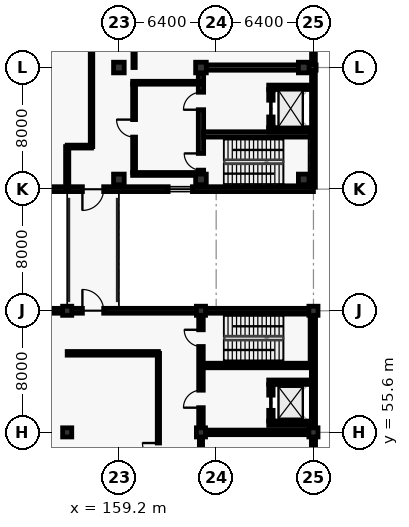
"""IFC4 building model, lengths in metres.
Left out: names, types, materials, properties, quantities, classifications, styles, units other than length and angle.
Written with IfcOpenShell. Run it as: python <this file> out.ifc"""

import sys

from ifc_helpers import new_model, si_unit, direction, frame, frame_2d, origin, origin_2d, place, context, subcontext, project, spatial, rectangle, extrude, element, fill, save


model = new_model("IFC4")
c1 = context("Model", 3, precision=1e-05, world=origin(), true_north=direction((0.0, 1.0)))
c2 = subcontext(c1, "Body", "Model", "MODEL_VIEW")
j1 = project(units=[si_unit("LENGTHUNIT", "METRE"), si_unit("PLANEANGLEUNIT", "RADIAN")], contexts=[c1])
p1 = place(None, origin())
s1 = spatial("IfcSite", under=j1, at=p1, CompositionType="ELEMENT")
p2 = place(p1, origin())
s2 = spatial("IfcBuilding", under=s1, at=p2, CompositionType="ELEMENT")
p3 = place(p2, frame((0.0, 0.0, 5.4)))
s3 = spatial("IfcBuildingStorey", under=s2, at=p3, CompositionType="ELEMENT", Elevation=5.4)
for number, where, z_axis, x_axis in (
    (1, (155.8, 55.6, 0.0), (0.0, 0.0, 1.0), (1.0, 0.0, 0.0)),
    (2, (155.8, 63.6, 0.0), (0.0, 0.0, 1.0), (1.0, 0.0, 0.0)),
    (3, (164.6, 55.6, 0.0), (0.0, 0.0, 1.0), (1.0, 0.0, 0.0)),
    (4, (164.6, 63.6, 0.0), (0.0, 0.0, 1.0), (1.0, 0.0, 0.0)),
    (5, (172.0, 55.6, 0.0), (0.0, 0.0, 1.0), (1.0, 0.0, 0.0)),
    (6, (172.0, 63.6, 0.0), (0.0, 0.0, 1.0), (1.0, 0.0, 0.0)),
):
    element("IfcColumn", number, at=place(p3, frame(where, z_axis=z_axis, x_axis=x_axis)), inside=s3, PredefinedType="COLUMN", context=c2, shape_type="SweptSolid", body=[
        extrude(rectangle(XDim=0.6, YDim=0.6, at=origin_2d()), origin(), (0.0, 0.0, 1.0), 4.8),
    ])
for number, where, z_axis, x_axis in (
    (7, (159.2, 72.24, 0.0), (0.0, 0.0, 1.0), (1.0, 0.0, 0.0)),
    (8, (159.2, 79.6, 0.0), (0.0, 0.0, 1.0), (1.0, 0.0, 0.0)),
    (9, (164.6, 72.24, 0.0), (0.0, 0.0, 1.0), (1.0, 0.0, 0.0)),
    (10, (164.6, 79.6, 0.0), (0.0, 0.0, 1.0), (1.0, 0.0, 0.0)),
    (11, (171.36, 72.24, 0.0), (0.0, 0.0, 1.0), (1.0, 0.0, 0.0)),
    (12, (171.36, 79.6, 0.0), (0.0, 0.0, 1.0), (1.0, 0.0, 0.0)),
):
    element("IfcColumn", number, at=place(p3, frame(where, z_axis=z_axis, x_axis=x_axis)), inside=s3, PredefinedType="COLUMN", context=c2, shape_type="SweptSolid", body=[
        extrude(rectangle(XDim=0.7, YDim=0.7, at=origin_2d()), origin(), (0.0, 0.0, 1.0), 4.8),
    ])
p4 = place(p3, frame((149.2, 63.6, 0.0), z_axis=(0.0, 0.0, 1.0), x_axis=(1.0, 0.0, 0.0)))
e13 = element("IfcWall", 13, at=p4, inside=s3, PredefinedType="SOLIDWALL", context=c2, shape_type="SweptSolid", body=[
    extrude(rectangle(XDim=22.8, YDim=0.32, at=frame_2d((11.4, 0.0))), origin(), (0.0, 0.0, 1.0), 3.67),
])
p5 = place(p4, frame((2.2, 0.0, 0.9)))
e14 = element("IfcOpeningElement", 14, at=p5, cuts=e13, PredefinedType="OPENING", context=c2, shape_type="SweptSolid", body=[
    extrude(rectangle(XDim=2.2, YDim=1.7, at=frame_2d((1.1, 0.85))), frame((0.0, 0.17, 0.0), z_axis=(0.0, -1.0, 0.0), x_axis=(1.0, 0.0, 0.0)), (0.0, 0.0, 1.0), 0.34),
])
p6 = place(p4, frame((7.6, 0.0, 0.0)))
e15 = element("IfcOpeningElement", 15, at=p6, cuts=e13, PredefinedType="OPENING", context=c2, shape_type="SweptSolid", body=[
    extrude(rectangle(XDim=1.4, YDim=2.25, at=frame_2d((0.7, 1.125))), frame((0.0, 0.17, 0.0), z_axis=(0.0, -1.0, 0.0), x_axis=(1.0, 0.0, 0.0)), (0.0, 0.0, 1.0), 0.34),
])
p7 = place(p3, frame((172.0, 63.6, 0.0), z_axis=(0.0, 0.0, 1.0), x_axis=(0.0, -1.0, 0.0)))
e16 = element("IfcWall", 16, at=p7, inside=s3, PredefinedType="SOLIDWALL", context=c2, shape_type="SweptSolid", body=[
    extrude(rectangle(XDim=56.0, YDim=0.275, at=frame_2d((28.0, 0.0))), origin(), (0.0, 0.0, 1.0), 3.67),
])
p8 = place(p7, frame((10.933, 0.0, 0.8)))
e17 = element("IfcOpeningElement", 17, at=p8, cuts=e16, PredefinedType="OPENING", context=c2, shape_type="SweptSolid", body=[
    extrude(rectangle(XDim=1.8, YDim=2.15, at=frame_2d((0.9, 1.075))), frame((0.0, 0.147, 0.0), z_axis=(0.0, -1.0, 0.0), x_axis=(1.0, 0.0, 0.0)), (0.0, 0.0, 1.0), 0.295),
])
p9 = place(p7, frame((19.667, 0.0, 0.8)))
e18 = element("IfcOpeningElement", 18, at=p9, cuts=e16, PredefinedType="OPENING", context=c2, shape_type="SweptSolid", body=[
    extrude(rectangle(XDim=1.9, YDim=2.2, at=frame_2d((0.95, 1.1))), frame((0.0, 0.147, 0.0), z_axis=(0.0, -1.0, 0.0), x_axis=(1.0, 0.0, 0.0)), (0.0, 0.0, 1.0), 0.295),
])
p10 = place(p7, frame((28.4, 0.0, 0.8)))
e19 = element("IfcOpeningElement", 19, at=p10, cuts=e16, PredefinedType="OPENING", context=c2, shape_type="SweptSolid", body=[
    extrude(rectangle(XDim=2.0, YDim=2.2, at=frame_2d((1.0, 1.1))), frame((0.0, 0.147, 0.0), z_axis=(0.0, -1.0, 0.0), x_axis=(1.0, 0.0, 0.0)), (0.0, 0.0, 1.0), 0.295),
])
p11 = place(p7, frame((37.133, 0.0, 0.8)))
e20 = element("IfcOpeningElement", 20, at=p11, cuts=e16, PredefinedType="OPENING", context=c2, shape_type="SweptSolid", body=[
    extrude(rectangle(XDim=2.1, YDim=2.2, at=frame_2d((1.05, 1.1))), frame((0.0, 0.147, 0.0), z_axis=(0.0, -1.0, 0.0), x_axis=(1.0, 0.0, 0.0)), (0.0, 0.0, 1.0), 0.295),
])
p12 = place(p7, frame((45.117, 0.0, 0.8)))
e21 = element("IfcOpeningElement", 21, at=p12, cuts=e16, PredefinedType="OPENING", context=c2, shape_type="SweptSolid", body=[
    extrude(rectangle(XDim=2.2, YDim=2.25, at=frame_2d((1.1, 1.125))), frame((0.0, 0.147, 0.0), z_axis=(0.0, -1.0, 0.0), x_axis=(1.0, 0.0, 0.0)), (0.0, 0.0, 1.0), 0.295),
])
p13 = place(p3, frame((172.0, 117.86, 0.0), z_axis=(0.0, 0.0, 1.0), x_axis=(0.0, -1.0, 0.0)))
e22 = element("IfcWall", 22, at=p13, inside=s3, PredefinedType="SOLIDWALL", context=c2, shape_type="SweptSolid", body=[
    extrude(rectangle(XDim=46.12, YDim=0.25, at=frame_2d((23.06, 0.0))), origin(), (0.0, 0.0, 1.0), 4.55),
])
p14 = place(p3, frame((172.0, 71.6, 0.0), z_axis=(0.0, 0.0, 1.0), x_axis=(-1.0, 0.0, 0.0)))
e23 = element("IfcWall", 23, at=p14, inside=s3, PredefinedType="SOLIDWALL", context=c2, shape_type="SweptSolid", body=[
    extrude(rectangle(XDim=32.4, YDim=0.32, at=frame_2d((16.2, 0.0))), origin(), (0.0, 0.0, 1.0), 3.85),
])
p15 = place(p14, frame((7.96, 0.0, 0.8)))
e24 = element("IfcOpeningElement", 24, at=p15, cuts=e23, PredefinedType="OPENING", context=c2, shape_type="SweptSolid", body=[
    extrude(rectangle(XDim=1.6, YDim=1.65, at=frame_2d((0.8, 0.825))), frame((0.0, 0.17, 0.0), z_axis=(0.0, -1.0, 0.0), x_axis=(1.0, 0.0, 0.0)), (0.0, 0.0, 1.0), 0.34),
])
p16 = place(p14, frame((19.48, 0.0, 0.8)))
e25 = element("IfcOpeningElement", 25, at=p16, cuts=e23, PredefinedType="OPENING", context=c2, shape_type="SweptSolid", body=[
    extrude(rectangle(XDim=1.6, YDim=1.65, at=frame_2d((0.8, 0.825))), frame((0.0, 0.17, 0.0), z_axis=(0.0, -1.0, 0.0), x_axis=(1.0, 0.0, 0.0)), (0.0, 0.0, 1.0), 0.34),
])
p17 = place(p14, frame((25.24, 0.0, 0.8)))
e26 = element("IfcOpeningElement", 26, at=p17, cuts=e23, PredefinedType="OPENING", context=c2, shape_type="SweptSolid", body=[
    extrude(rectangle(XDim=1.6, YDim=1.65, at=frame_2d((0.8, 0.825))), frame((0.0, 0.17, 0.0), z_axis=(0.0, -1.0, 0.0), x_axis=(1.0, 0.0, 0.0)), (0.0, 0.0, 1.0), 0.34),
])
p18 = place(p14, frame((13.8, 0.0, 0.0)))
e27 = element("IfcOpeningElement", 27, at=p18, cuts=e23, PredefinedType="OPENING", context=c2, shape_type="SweptSolid", body=[
    extrude(rectangle(XDim=1.4, YDim=2.25, at=frame_2d((0.7, 1.125))), frame((0.0, 0.17, 0.0), z_axis=(0.0, -1.0, 0.0), x_axis=(1.0, 0.0, 0.0)), (0.0, 0.0, 1.0), 0.34),
])
p19 = place(p3, frame((164.952, 79.6, 0.0), z_axis=(0.0, 0.0, 1.0), x_axis=(1.0, 0.0, 0.0)))
e28 = element("IfcWall", 28, at=p19, inside=s3, PredefinedType="SHEAR", context=c2, shape_type="SweptSolid", body=[
    extrude(rectangle(XDim=7.223, YDim=0.35, at=frame_2d((3.612, 0.0))), origin(), (0.0, 0.0, 1.0), 4.55),
])
p20 = place(p3, frame((164.6, 71.775, 0.0), z_axis=(0.0, 0.0, 1.0), x_axis=(0.0, 1.0, 0.0)))
e29 = element("IfcWall", 29, at=p20, inside=s3, PredefinedType="SHEAR", context=c2, shape_type="SweptSolid", body=[
    extrude(rectangle(XDim=7.473, YDim=0.35, at=frame_2d((3.737, 0.0))), origin(), (0.0, 0.0, 1.0), 4.55),
])
p21 = place(p20, frame((1.075, 0.0, 0.0)))
e30 = element("IfcOpeningElement", 30, at=p21, cuts=e29, PredefinedType="OPENING", context=c2, shape_type="SweptSolid", body=[
    extrude(rectangle(XDim=1.1, YDim=2.15, at=frame_2d((0.55, 1.075))), frame((0.0, 0.185, 0.0), z_axis=(0.0, -1.0, 0.0), x_axis=(1.0, 0.0, 0.0)), (0.0, 0.0, 1.0), 0.37),
])
p22 = place(p20, frame((5.05, 0.0, 0.0)))
e31 = element("IfcOpeningElement", 31, at=p22, cuts=e29, PredefinedType="OPENING", context=c2, shape_type="SweptSolid", body=[
    extrude(rectangle(XDim=1.15, YDim=2.2, at=frame_2d((0.575, 1.1))), frame((0.0, 0.185, 0.0), z_axis=(0.0, -1.0, 0.0), x_axis=(1.0, 0.0, 0.0)), (0.0, 0.0, 1.0), 0.37),
])
p23 = place(p3, frame((164.775, 75.2, 0.0), z_axis=(0.0, 0.0, 1.0), x_axis=(1.0, 0.0, 0.0)))
e32 = element("IfcWall", 32, at=p23, inside=s3, PredefinedType="SHEAR", context=c2, shape_type="SweptSolid", body=[
    extrude(rectangle(XDim=7.05, YDim=0.35, at=frame_2d((3.525, 0.0))), origin(), (0.0, 0.0, 1.0), 4.55),
])
for number, where, z_axis, x_axis in (
    (33, (169.055, 75.5, 0.0), (0.0, 0.0, 1.0), (1.0, 0.0, 0.0)),
    (34, (169.055, 78.3, 0.0), (0.0, 0.0, 1.0), (1.0, 0.0, 0.0)),
):
    element("IfcWall", number, at=place(p3, frame(where, z_axis=z_axis, x_axis=x_axis)), inside=s3, PredefinedType="SHEAR", context=c2, shape_type="SweptSolid", body=[
        extrude(rectangle(XDim=2.89, YDim=0.29, at=frame_2d((1.445, 0.0))), origin(), (0.0, 0.0, 1.0), 4.55),
    ])
p24 = place(p3, frame((169.2, 75.645, 0.0), z_axis=(0.0, 0.0, 1.0), x_axis=(0.0, 1.0, 0.0)))
e35 = element("IfcWall", 35, at=p24, inside=s3, PredefinedType="SHEAR", context=c2, shape_type="SweptSolid", body=[
    extrude(rectangle(XDim=2.51, YDim=0.29, at=frame_2d((1.255, 0.0))), origin(), (0.0, 0.0, 1.0), 4.55),
])
p25 = place(p24, frame((0.705, 0.0, 0.0)))
e36 = element("IfcOpeningElement", 36, at=p25, cuts=e35, PredefinedType="OPENING", context=c2, shape_type="SweptSolid", body=[
    extrude(rectangle(XDim=1.1, YDim=2.15, at=frame_2d((0.55, 1.075))), frame((0.0, 0.155, 0.0), z_axis=(0.0, -1.0, 0.0), x_axis=(1.0, 0.0, 0.0)), (0.0, 0.0, 1.0), 0.31),
])
p26 = place(p3, frame((160.105, 72.6, 0.0), z_axis=(0.0, 0.0, 1.0), x_axis=(1.0, 0.0, 0.0)))
e37 = element("IfcWall", 37, at=p26, inside=s3, PredefinedType="PARTITIONING", context=c2, shape_type="SweptSolid", body=[
    extrude(rectangle(XDim=4.143, YDim=0.19, at=frame_2d((2.072, 0.0))), origin(), (0.0, 0.0, 1.0), 3.9),
])
p27 = place(p3, frame((160.105, 78.6, 0.0), z_axis=(0.0, 0.0, 1.0), x_axis=(1.0, 0.0, 0.0)))
e38 = element("IfcWall", 38, at=p27, inside=s3, PredefinedType="PARTITIONING", context=c2, shape_type="SweptSolid", body=[
    extrude(rectangle(XDim=4.495, YDim=0.19, at=frame_2d((2.248, 0.0))), origin(), (0.0, 0.0, 1.0), 4.55),
])
p28 = place(p3, frame((160.2, 72.695, 0.0), z_axis=(0.0, 0.0, 1.0), x_axis=(0.0, 1.0, 0.0)))
e39 = element("IfcWall", 39, at=p28, inside=s3, PredefinedType="PARTITIONING", context=c2, shape_type="SweptSolid", body=[
    extrude(rectangle(XDim=5.81, YDim=0.19, at=frame_2d((2.905, 0.0))), origin(), (0.0, 0.0, 1.0), 4.55),
])
p29 = place(p28, frame((2.33, 0.0, 0.0)))
e40 = element("IfcOpeningElement", 40, at=p29, cuts=e39, PredefinedType="OPENING", context=c2, shape_type="SweptSolid", body=[
    extrude(rectangle(XDim=1.15, YDim=2.2, at=frame_2d((0.575, 1.1))), frame((0.0, 0.105, 0.0), z_axis=(0.0, -1.0, 0.0), x_axis=(1.0, 0.0, 0.0)), (0.0, 0.0, 1.0), 0.21),
])
p30 = place(p3, frame((164.902, 55.6, 0.0), z_axis=(0.0, 0.0, 1.0), x_axis=(1.0, 0.0, 0.0)))
e41 = element("IfcWall", 41, at=p30, inside=s3, PredefinedType="SHEAR", context=c2, shape_type="SweptSolid", body=[
    extrude(rectangle(XDim=6.796, YDim=0.3, at=frame_2d((3.398, 0.0))), origin(), (0.0, 0.0, 1.0), 4.52),
])
p31 = place(p3, frame((164.6, 55.902, 0.0), z_axis=(0.0, 0.0, 1.0), x_axis=(0.0, 1.0, 0.0)))
e42 = element("IfcWall", 42, at=p31, inside=s3, PredefinedType="SHEAR", context=c2, shape_type="SweptSolid", body=[
    extrude(rectangle(XDim=7.396, YDim=0.3, at=frame_2d((3.698, 0.0))), origin(), (0.0, 0.0, 1.0), 4.52),
])
p32 = place(p31, frame((5.348, 0.0, 0.0)))
e43 = element("IfcOpeningElement", 43, at=p32, cuts=e42, PredefinedType="OPENING", context=c2, shape_type="SweptSolid", body=[
    extrude(rectangle(XDim=1.1, YDim=2.15, at=frame_2d((0.55, 1.075))), frame((0.0, 0.16, 0.0), z_axis=(0.0, -1.0, 0.0), x_axis=(1.0, 0.0, 0.0)), (0.0, 0.0, 1.0), 0.32),
])
p33 = place(p31, frame((1.323, 0.0, 0.0)))
e44 = element("IfcOpeningElement", 44, at=p33, cuts=e42, PredefinedType="OPENING", context=c2, shape_type="SweptSolid", body=[
    extrude(rectangle(XDim=1.15, YDim=2.2, at=frame_2d((0.575, 1.1))), frame((0.0, 0.16, 0.0), z_axis=(0.0, -1.0, 0.0), x_axis=(1.0, 0.0, 0.0)), (0.0, 0.0, 1.0), 0.32),
])
p34 = place(p3, frame((164.75, 60.0, 0.0), z_axis=(0.0, 0.0, 1.0), x_axis=(1.0, 0.0, 0.0)))
e45 = element("IfcWall", 45, at=p34, inside=s3, PredefinedType="SHEAR", context=c2, shape_type="SweptSolid", body=[
    extrude(rectangle(XDim=7.1, YDim=0.3, at=frame_2d((3.55, 0.0))), origin(), (0.0, 0.0, 1.0), 4.52),
])
for number, where, z_axis, x_axis in (
    (46, (169.055, 56.2, 0.0), (0.0, 0.0, 1.0), (1.0, 0.0, 0.0)),
    (47, (169.055, 58.9, 0.0), (0.0, 0.0, 1.0), (1.0, 0.0, 0.0)),
):
    element("IfcWall", number, at=place(p3, frame(where, z_axis=z_axis, x_axis=x_axis)), inside=s3, PredefinedType="SHEAR", context=c2, shape_type="SweptSolid", body=[
        extrude(rectangle(XDim=2.89, YDim=0.29, at=frame_2d((1.445, 0.0))), origin(), (0.0, 0.0, 1.0), 4.52),
    ])
p35 = place(p3, frame((169.2, 56.345, 0.0), z_axis=(0.0, 0.0, 1.0), x_axis=(0.0, 1.0, 0.0)))
e48 = element("IfcWall", 48, at=p35, inside=s3, PredefinedType="SHEAR", context=c2, shape_type="SweptSolid", body=[
    extrude(rectangle(XDim=2.41, YDim=0.29, at=frame_2d((1.205, 0.0))), origin(), (0.0, 0.0, 1.0), 4.52),
])
p36 = place(p35, frame((0.705, 0.0, 0.0)))
e49 = element("IfcOpeningElement", 49, at=p36, cuts=e48, PredefinedType="OPENING", context=c2, shape_type="SweptSolid", body=[
    extrude(rectangle(XDim=1.0, YDim=2.15, at=frame_2d((0.5, 1.075))), frame((0.0, 0.155, 0.0), z_axis=(0.0, -1.0, 0.0), x_axis=(1.0, 0.0, 0.0)), (0.0, 0.0, 1.0), 0.31),
])
p37 = place(p3, frame((161.8, 31.6, 0.0), z_axis=(0.0, 0.0, 1.0), x_axis=(0.0, 1.0, 0.0)))
e50 = element("IfcWall", 50, at=p37, inside=s3, PredefinedType="PARTITIONING", context=c2, shape_type="SweptSolid", body=[
    extrude(rectangle(XDim=29.2, YDim=0.15, at=frame_2d((14.6, 0.0))), origin(), (0.0, 0.0, 1.0), 4.52),
])
p38 = place(p37, frame((14.075, 0.0, 0.0)))
e51 = element("IfcOpeningElement", 51, at=p38, cuts=e50, PredefinedType="OPENING", context=c2, shape_type="SweptSolid", body=[
    extrude(rectangle(XDim=1.05, YDim=2.15, at=frame_2d((0.525, 1.075))), frame((0.0, 0.085, 0.0), z_axis=(0.0, -1.0, 0.0), x_axis=(1.0, 0.0, 0.0)), (0.0, 0.0, 1.0), 0.17),
])
p39 = place(p37, frame((22.251, 0.0, 0.0)))
e52 = element("IfcOpeningElement", 52, at=p39, cuts=e50, PredefinedType="OPENING", context=c2, shape_type="SweptSolid", body=[
    extrude(rectangle(XDim=1.05, YDim=2.15, at=frame_2d((0.525, 1.075))), frame((0.0, 0.085, 0.0), z_axis=(0.0, -1.0, 0.0), x_axis=(1.0, 0.0, 0.0)), (0.0, 0.0, 1.0), 0.17),
])
p40 = place(p3, frame((161.8, 60.8, 0.0), z_axis=(0.0, 0.0, 1.0), x_axis=(-1.0, 0.0, 0.0)))
e53 = element("IfcWall", 53, at=p40, inside=s3, PredefinedType="PARTITIONING", context=c2, shape_type="SweptSolid", body=[
    extrude(rectangle(XDim=6.0, YDim=0.24, at=frame_2d((3.0, 0.0))), origin(), (0.0, 0.0, 1.0), 4.52),
])
p41 = place(p3, frame((164.6, 55.298, 0.0), z_axis=(0.0, 0.0, 1.0), x_axis=(0.0, -1.0, 0.0)))
e54 = element("IfcWall", 54, at=p41, inside=s3, PredefinedType="PARTITIONING", context=c2, shape_type="SweptSolid", body=[
    extrude(rectangle(XDim=47.396, YDim=0.21, at=frame_2d((23.698, 0.0))), origin(), (0.0, 0.0, 1.0), 3.67),
])
p42 = place(p41, frame((24.18, 0.0, 0.0)))
e55 = element("IfcOpeningElement", 55, at=p42, cuts=e54, PredefinedType="OPENING", context=c2, shape_type="SweptSolid", body=[
    extrude(rectangle(XDim=1.55, YDim=2.25, at=frame_2d((0.775, 1.125))), frame((0.0, 0.115, 0.0), z_axis=(0.0, -1.0, 0.0), x_axis=(1.0, 0.0, 0.0)), (0.0, 0.0, 1.0), 0.23),
])
p43 = place(p41, frame((36.269, 0.0, 0.0)))
e56 = element("IfcOpeningElement", 56, at=p43, cuts=e54, PredefinedType="OPENING", context=c2, shape_type="SweptSolid", body=[
    extrude(rectangle(XDim=1.4, YDim=2.25, at=frame_2d((0.7, 1.125))), frame((0.0, 0.115, 0.0), z_axis=(0.0, -1.0, 0.0), x_axis=(1.0, 0.0, 0.0)), (0.0, 0.0, 1.0), 0.23),
])
p44 = place(p3, frame((155.8, 71.6, 0.0), z_axis=(0.0, 0.0, 1.0), x_axis=(0.0, 1.0, 0.0)))
e57 = element("IfcWall", 57, at=p44, inside=s3, PredefinedType="PARTITIONING", context=c2, shape_type="SweptSolid", body=[
    extrude(rectangle(XDim=2.8, YDim=0.21, at=frame_2d((1.4, 0.0))), origin(), (0.0, 0.0, 1.0), 4.55),
])
p45 = place(p3, frame((155.8, 74.4, 0.0), z_axis=(0.0, 0.0, 1.0), x_axis=(1.0, 0.0, 0.0)))
e58 = element("IfcWall", 58, at=p45, inside=s3, PredefinedType="PARTITIONING", context=c2, shape_type="SweptSolid", body=[
    extrude(rectangle(XDim=1.6, YDim=0.19, at=frame_2d((0.8, 0.0))), origin(), (0.0, 0.0, 1.0), 4.55),
])
p46 = place(p3, frame((157.4, 74.4, 0.0), z_axis=(0.0, 0.0, 1.0), x_axis=(0.0, 1.0, 0.0)))
e59 = element("IfcWall", 59, at=p46, inside=s3, PredefinedType="PARTITIONING", context=c2, shape_type="SweptSolid", body=[
    extrude(rectangle(XDim=27.6, YDim=0.165, at=frame_2d((13.8, 0.0))), origin(), (0.0, 0.0, 1.0), 4.55),
])
p47 = place(p46, frame((13.34, 0.0, 0.0)))
e60 = element("IfcOpeningElement", 60, at=p47, cuts=e59, PredefinedType="OPENING", context=c2, shape_type="SweptSolid", body=[
    extrude(rectangle(XDim=0.92, YDim=2.1, at=frame_2d((0.46, 1.05))), frame((0.0, 0.093, 0.0), z_axis=(0.0, -1.0, 0.0), x_axis=(1.0, 0.0, 0.0)), (0.0, 0.0, 1.0), 0.185),
])
p48 = place(p46, frame((21.068, 0.0, 0.0)))
e61 = element("IfcOpeningElement", 61, at=p48, cuts=e59, PredefinedType="OPENING", context=c2, shape_type="SweptSolid", body=[
    extrude(rectangle(XDim=0.92, YDim=2.1, at=frame_2d((0.46, 1.05))), frame((0.0, 0.093, 0.0), z_axis=(0.0, -1.0, 0.0), x_axis=(1.0, 0.0, 0.0)), (0.0, 0.0, 1.0), 0.185),
])
p49 = place(p3, frame((160.2, 102.0, 0.0), z_axis=(0.0, 0.0, 1.0), x_axis=(0.0, -1.0, 0.0)))
e62 = element("IfcWall", 62, at=p49, inside=s3, PredefinedType="PARTITIONING", context=c2, shape_type="SweptSolid", body=[
    extrude(rectangle(XDim=22.4, YDim=0.15, at=frame_2d((11.2, 0.0))), origin(), (0.0, 0.0, 1.0), 4.55),
])
p50 = place(p49, frame((10.69, 0.0, 0.0)))
e63 = element("IfcOpeningElement", 63, at=p50, cuts=e62, PredefinedType="OPENING", context=c2, shape_type="SweptSolid", body=[
    extrude(rectangle(XDim=1.02, YDim=2.1, at=frame_2d((0.51, 1.05))), frame((0.0, 0.085, 0.0), z_axis=(0.0, -1.0, 0.0), x_axis=(1.0, 0.0, 0.0)), (0.0, 0.0, 1.0), 0.17),
])
p51 = place(p49, frame((16.962, 0.0, 0.0)))
e64 = element("IfcOpeningElement", 64, at=p51, cuts=e62, PredefinedType="OPENING", context=c2, shape_type="SweptSolid", body=[
    extrude(rectangle(XDim=1.02, YDim=2.1, at=frame_2d((0.51, 1.05))), frame((0.0, 0.085, 0.0), z_axis=(0.0, -1.0, 0.0), x_axis=(1.0, 0.0, 0.0)), (0.0, 0.0, 1.0), 0.17),
])
p52 = place(p15, origin())
e65 = element("IfcWindow", 65, at=p52, inside=s3, PartitioningType="SINGLE_PANEL", PredefinedType="WINDOW", context=c2, shape_type="SweptSolid", body=[
    extrude(rectangle(XDim=1.6, YDim=1.65, at=frame_2d((0.8, 0.825))), frame((0.0, 0.03, 0.0), z_axis=(0.0, -1.0, 0.0), x_axis=(1.0, 0.0, 0.0)), (0.0, 0.0, 1.0), 0.06),
])
fill(e24, e65)
p53 = place(p21, origin())
e66 = element("IfcDoor", 66, at=p53, inside=s3, OperationType="SINGLE_SWING_RIGHT", PredefinedType="DOOR", context=c2, shape_type="SweptSolid", body=[
    extrude(rectangle(XDim=1.1, YDim=2.15, at=frame_2d((0.55, 1.075))), frame((0.0, 0.025, 0.0), z_axis=(0.0, -1.0, 0.0), x_axis=(1.0, 0.0, 0.0)), (0.0, 0.0, 1.0), 0.05),
])
fill(e30, e66)
p54 = place(p22, origin())
e67 = element("IfcDoor", 67, at=p54, inside=s3, OperationType="SINGLE_SWING_LEFT", PredefinedType="DOOR", context=c2, shape_type="SweptSolid", body=[
    extrude(rectangle(XDim=1.15, YDim=2.2, at=frame_2d((0.575, 1.1))), frame((0.0, 0.025, 0.0), z_axis=(0.0, -1.0, 0.0), x_axis=(1.0, 0.0, 0.0)), (0.0, 0.0, 1.0), 0.05),
])
fill(e31, e67)
p55 = place(p25, origin())
e68 = element("IfcDoor", 68, at=p55, inside=s3, OperationType="SLIDING_TO_LEFT", PredefinedType="DOOR", context=c2, shape_type="SweptSolid", body=[
    extrude(rectangle(XDim=1.1, YDim=2.15, at=frame_2d((0.55, 1.075))), frame((0.0, 0.025, 0.0), z_axis=(0.0, -1.0, 0.0), x_axis=(1.0, 0.0, 0.0)), (0.0, 0.0, 1.0), 0.05),
])
fill(e36, e68)
p56 = place(p29, origin())
e69 = element("IfcDoor", 69, at=p56, inside=s3, OperationType="SINGLE_SWING_RIGHT", PredefinedType="DOOR", context=c2, shape_type="SweptSolid", body=[
    extrude(rectangle(XDim=1.15, YDim=2.2, at=frame_2d((0.575, 1.1))), frame((0.0, 0.025, 0.0), z_axis=(0.0, -1.0, 0.0), x_axis=(1.0, 0.0, 0.0)), (0.0, 0.0, 1.0), 0.05),
])
fill(e40, e69)
p57 = place(p32, origin())
e70 = element("IfcDoor", 70, at=p57, inside=s3, OperationType="SINGLE_SWING_RIGHT", PredefinedType="DOOR", context=c2, shape_type="SweptSolid", body=[
    extrude(rectangle(XDim=1.1, YDim=2.15, at=frame_2d((0.55, 1.075))), frame((0.0, 0.025, 0.0), z_axis=(0.0, -1.0, 0.0), x_axis=(1.0, 0.0, 0.0)), (0.0, 0.0, 1.0), 0.05),
])
fill(e43, e70)
p58 = place(p33, origin())
e71 = element("IfcDoor", 71, at=p58, inside=s3, OperationType="SINGLE_SWING_LEFT", PredefinedType="DOOR", context=c2, shape_type="SweptSolid", body=[
    extrude(rectangle(XDim=1.15, YDim=2.2, at=frame_2d((0.575, 1.1))), frame((0.0, 0.025, 0.0), z_axis=(0.0, -1.0, 0.0), x_axis=(1.0, 0.0, 0.0)), (0.0, 0.0, 1.0), 0.05),
])
fill(e44, e71)
p59 = place(p36, origin())
e72 = element("IfcDoor", 72, at=p59, inside=s3, OperationType="SLIDING_TO_LEFT", PredefinedType="DOOR", context=c2, shape_type="SweptSolid", body=[
    extrude(rectangle(XDim=1.0, YDim=2.15, at=frame_2d((0.5, 1.075))), frame((0.0, 0.025, 0.0), z_axis=(0.0, -1.0, 0.0), x_axis=(1.0, 0.0, 0.0)), (0.0, 0.0, 1.0), 0.05),
])
fill(e49, e72)
p60 = place(p6, origin())
e73 = element("IfcDoor", 73, at=p60, inside=s3, OperationType="SINGLE_SWING_LEFT", PredefinedType="DOOR", context=c2, shape_type="SweptSolid", body=[
    extrude(rectangle(XDim=1.4, YDim=2.25, at=frame_2d((0.7, 1.125))), frame((0.0, 0.025, 0.0), z_axis=(0.0, -1.0, 0.0), x_axis=(1.0, 0.0, 0.0)), (0.0, 0.0, 1.0), 0.05),
])
fill(e15, e73)
p61 = place(p18, origin())
e74 = element("IfcDoor", 74, at=p61, inside=s3, OperationType="SINGLE_SWING_RIGHT", PredefinedType="DOOR", context=c2, shape_type="SweptSolid", body=[
    extrude(rectangle(XDim=1.4, YDim=2.25, at=frame_2d((0.7, 1.125))), frame((0.0, 0.025, 0.0), z_axis=(0.0, -1.0, 0.0), x_axis=(1.0, 0.0, 0.0)), (0.0, 0.0, 1.0), 0.05),
])
fill(e27, e74)
p62 = place(p39, origin())
e75 = element("IfcDoor", 75, at=p62, inside=s3, OperationType="SINGLE_SWING_RIGHT", PredefinedType="DOOR", context=c2, shape_type="SweptSolid", body=[
    extrude(rectangle(XDim=1.05, YDim=2.15, at=frame_2d((0.525, 1.075))), frame((0.0, 0.025, 0.0), z_axis=(0.0, -1.0, 0.0), x_axis=(1.0, 0.0, 0.0)), (0.0, 0.0, 1.0), 0.05),
])
fill(e52, e75)
save(model, sys.argv[1])
